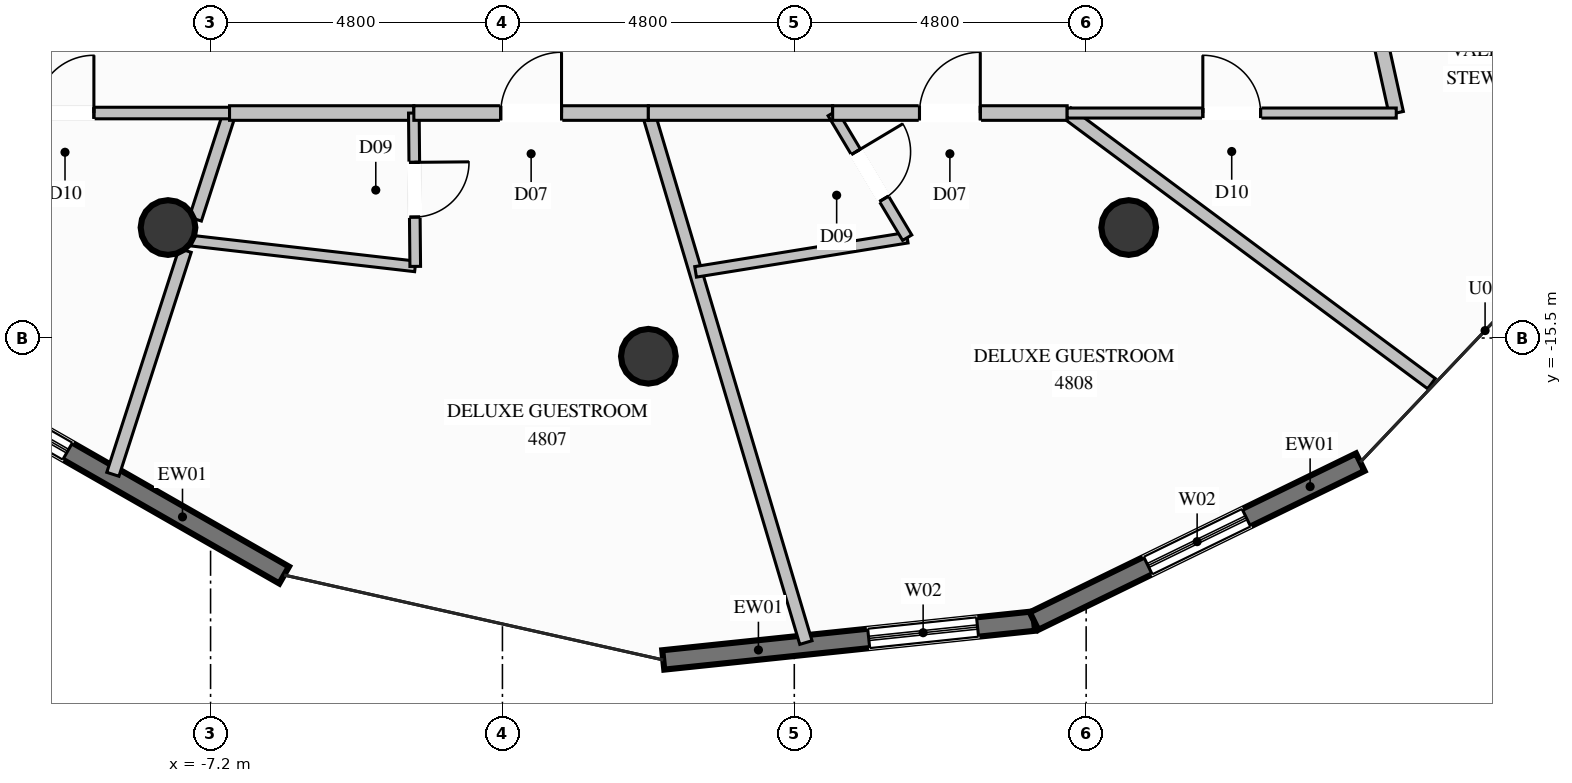
"""IFC4 building model, lengths in metres.
Left out: names, types, materials, properties, quantities, classifications, styles, units other than length and angle.
Written with IfcOpenShell. Run it as: python <this file> out.ifc"""

import sys

from ifc_helpers import new_model, si_unit, direction, frame, frame_2d, origin, origin_2d, place, context, subcontext, project, spatial, rectangle, circle, extrude, element, fill, save


model = new_model("IFC4")
c1 = context("Model", 3, precision=1e-05, world=origin(), true_north=direction((0.0, 1.0)))
c2 = subcontext(c1, "Body", "Model", "MODEL_VIEW")
j1 = project(units=[si_unit("LENGTHUNIT", "METRE"), si_unit("PLANEANGLEUNIT", "RADIAN")], contexts=[c1])
p1 = place(None, origin())
s1 = spatial("IfcSite", under=j1, at=p1, CompositionType="ELEMENT")
p2 = place(p1, origin())
s2 = spatial("IfcBuilding", under=s1, at=p2, CompositionType="ELEMENT")
p3 = place(p2, frame((0.0, 0.0, 180.4)))
s3 = spatial("IfcBuildingStorey", under=s2, at=p3, CompositionType="ELEMENT", Elevation=180.4)
for number, where, z_axis, x_axis in (
    (1, (-7.9, -13.683, 0.0), (0.0, 0.0, 1.0), (1.0, 0.0, 0.0)),
    (2, (0.0, -15.8, 0.0), (0.0, 0.0, 1.0), (1.0, 0.0, 0.0)),
    (3, (7.9, -13.683, 0.0), (0.0, 0.0, 1.0), (1.0, 0.0, 0.0)),
):
    element("IfcColumn", number, at=place(p3, frame(where, z_axis=z_axis, x_axis=x_axis)), inside=s3, PredefinedType="COLUMN", context=c2, shape_type="SweptSolid", body=[
        extrude(circle(Radius=0.45, at=origin_2d()), origin(), (0.0, 0.0, 1.0), 3.6),
    ])
p4 = place(p3, frame((-5.99, -19.398, 0.0), z_axis=(0.0, 0.0, 1.0), x_axis=(-0.868052920032, 0.496471678974, 0.0)))
e4 = element("IfcWall", 4, at=p4, inside=s3, PredefinedType="SOLIDWALL", context=c2, shape_type="SweptSolid", body=[
    extrude(rectangle(XDim=6.637, YDim=0.32, at=frame_2d((3.318, 0.0))), origin(), (0.0, 0.0, 1.0), 3.36),
])
p5 = place(p4, frame((4.102, 0.0, 0.35)))
e5 = element("IfcOpeningElement", 5, at=p5, cuts=e4, PredefinedType="OPENING", context=c2, shape_type="SweptSolid", body=[
    extrude(rectangle(XDim=1.8, YDim=2.6, at=frame_2d((0.9, 1.3))), frame((0.0, 0.17, 0.0), z_axis=(0.0, -1.0, 0.0), x_axis=(1.0, 0.0, 0.0)), (0.0, 0.0, 1.0), 0.34),
])
p6 = place(p3, frame((6.343, -20.155, 0.0), z_axis=(0.0, 0.0, 1.0), x_axis=(-0.994555738522, -0.104205964195, 0.0)))
e6 = element("IfcWall", 6, at=p6, inside=s3, PredefinedType="SOLIDWALL", context=c2, shape_type="SweptSolid", body=[
    extrude(rectangle(XDim=6.131, YDim=0.32, at=frame_2d((3.066, 0.0))), origin(), (0.0, 0.0, 1.0), 3.36),
])
p7 = place(p6, frame((0.934, 0.0, 0.35)))
e7 = element("IfcOpeningElement", 7, at=p7, cuts=e6, PredefinedType="OPENING", context=c2, shape_type="SweptSolid", body=[
    extrude(rectangle(XDim=1.8, YDim=2.6, at=frame_2d((0.9, 1.3))), frame((0.0, 0.17, 0.0), z_axis=(0.0, -1.0, 0.0), x_axis=(1.0, 0.0, 0.0)), (0.0, 0.0, 1.0), 0.34),
])
p8 = place(p3, frame((11.708, -17.542, 0.0), z_axis=(0.0, 0.0, 1.0), x_axis=(-0.899034471399, -0.437877858811, 0.0)))
e8 = element("IfcWall", 8, at=p8, inside=s3, PredefinedType="SOLIDWALL", context=c2, shape_type="SweptSolid", body=[
    extrude(rectangle(XDim=5.968, YDim=0.32, at=frame_2d((2.984, 0.0))), origin(), (0.0, 0.0, 1.0), 3.36),
])
p9 = place(p8, frame((2.084, 0.0, 0.35)))
e9 = element("IfcOpeningElement", 9, at=p9, cuts=e8, PredefinedType="OPENING", context=c2, shape_type="SweptSolid", body=[
    extrude(rectangle(XDim=1.8, YDim=2.6, at=frame_2d((0.9, 1.3))), frame((0.0, 0.17, 0.0), z_axis=(0.0, -1.0, 0.0), x_axis=(1.0, 0.0, 0.0)), (0.0, 0.0, 1.0), 0.34),
])
p10 = place(p3, frame((-6.888, -11.8, 0.0), z_axis=(0.0, 0.0, 1.0), x_axis=(-0.307220756357, -0.95163827522, 0.0)))
e10 = element("IfcWall", 10, at=p10, inside=s3, PredefinedType="PARTITIONING", context=c2, shape_type="SweptSolid", body=[
    extrude(rectangle(XDim=1.833, YDim=0.21, at=frame_2d((0.916, 0.0))), origin(), (0.0, 0.0, 1.0), 2.801),
])
p11 = place(p3, frame((-7.618, -14.059, 0.0), z_axis=(0.0, 0.0, 1.0), x_axis=(-0.307297747986, -0.9516134163, 0.0)))
e11 = element("IfcWall", 11, at=p11, inside=s3, PredefinedType="PARTITIONING", context=c2, shape_type="SweptSolid", body=[
    extrude(rectangle(XDim=3.869, YDim=0.21, at=frame_2d((1.935, 0.0))), origin(), (0.0, 0.0, 1.0), 3.36),
])
p12 = place(p3, frame((-12.3, -11.8, 0.0), z_axis=(0.0, 0.0, 1.0), x_axis=(1.0, 0.0, 0.0)))
e12 = element("IfcWall", 12, at=p12, inside=s3, PredefinedType="PARTITIONING", context=c2, shape_type="SweptSolid", body=[
    extrude(rectangle(XDim=5.412, YDim=0.19, at=frame_2d((2.706, 0.0))), origin(), (0.0, 0.0, 1.0), 3.36),
])
p13 = place(p12, frame((2.231, 0.0, 0.0)))
e13 = element("IfcOpeningElement", 13, at=p13, cuts=e12, PredefinedType="OPENING", context=c2, shape_type="SweptSolid", body=[
    extrude(rectangle(XDim=0.95, YDim=2.1, at=frame_2d((0.475, 1.05))), frame((0.0, 0.105, 0.0), z_axis=(0.0, -1.0, 0.0), x_axis=(1.0, 0.0, 0.0)), (0.0, 0.0, 1.0), 0.21),
])
p14 = place(p3, frame((-6.888, -11.8, 0.0), z_axis=(0.0, 0.0, 1.0), x_axis=(1.0, 0.0, 0.0)))
e14 = element("IfcWall", 14, at=p14, inside=s3, PredefinedType="PARTITIONING", context=c2, shape_type="SweptSolid", body=[
    extrude(rectangle(XDim=3.031, YDim=0.24, at=frame_2d((1.516, 0.0))), origin(), (0.0, 0.0, 1.0), 3.36),
])
p15 = place(p3, frame((-7.564, -13.893, 0.0), z_axis=(0.0, 0.0, 1.0), x_axis=(0.993452151759, -0.114248948203, 0.0)))
e15 = element("IfcWall", 15, at=p15, inside=s3, PredefinedType="PLUMBINGWALL", context=c2, shape_type="SweptSolid", body=[
    extrude(rectangle(XDim=3.755, YDim=0.175, at=frame_2d((1.877, 0.0))), origin(), (0.0, 0.0, 1.0), 2.929),
])
p16 = place(p3, frame((-3.857, -11.8, 0.0), z_axis=(0.0, 0.0, 1.0), x_axis=(0.009099332858, -0.999958600214, 0.0)))
e16 = element("IfcWall", 16, at=p16, inside=s3, PredefinedType="PLUMBINGWALL", context=c2, shape_type="SweptSolid", body=[
    extrude(rectangle(XDim=2.522, YDim=0.175, at=frame_2d((1.261, 0.0))), origin(), (0.0, 0.0, 1.0), 3.36),
])
p17 = place(p16, frame((0.811, 0.0, 0.0)))
e17 = element("IfcOpeningElement", 17, at=p17, cuts=e16, PredefinedType="OPENING", context=c2, shape_type="SweptSolid", body=[
    extrude(rectangle(XDim=0.9, YDim=2.1, at=frame_2d((0.45, 1.05))), frame((0.0, 0.098, 0.0), z_axis=(0.0, -1.0, 0.0), x_axis=(1.0, 0.0, 0.0)), (0.0, 0.0, 1.0), 0.195),
])
p18 = place(p3, frame((0.0, -11.8, 0.0), z_axis=(0.0, 0.0, 1.0), x_axis=(0.285192468368, -0.958470268702, 0.0)))
e18 = element("IfcWall", 18, at=p18, inside=s3, PredefinedType="PARTITIONING", context=c2, shape_type="SweptSolid", body=[
    extrude(rectangle(XDim=9.085, YDim=0.21, at=frame_2d((4.542, 0.0))), origin(), (0.0, 0.0, 1.0), 3.36),
])
p19 = place(p3, frame((-3.857, -11.8, 0.0), z_axis=(0.0, 0.0, 1.0), x_axis=(1.0, 0.0, 0.0)))
e19 = element("IfcWall", 19, at=p19, inside=s3, PredefinedType="PARTITIONING", context=c2, shape_type="SweptSolid", body=[
    extrude(rectangle(XDim=3.857, YDim=0.24, at=frame_2d((1.928, 0.0))), origin(), (0.0, 0.0, 1.0), 3.36),
])
p20 = place(p19, frame((1.429, 0.0, 0.0)))
e20 = element("IfcOpeningElement", 20, at=p20, cuts=e19, PredefinedType="OPENING", context=c2, shape_type="SweptSolid", body=[
    extrude(rectangle(XDim=1.0, YDim=2.2, at=frame_2d((0.5, 1.1))), frame((0.0, 0.13, 0.0), z_axis=(0.0, -1.0, 0.0), x_axis=(1.0, 0.0, 0.0)), (0.0, 0.0, 1.0), 0.26),
])
p21 = place(p3, frame((0.0, -11.8, 0.0), z_axis=(0.0, 0.0, 1.0), x_axis=(1.0, 0.0, 0.0)))
e21 = element("IfcWall", 21, at=p21, inside=s3, PredefinedType="PARTITIONING", context=c2, shape_type="SweptSolid", body=[
    extrude(rectangle(XDim=3.031, YDim=0.24, at=frame_2d((1.516, 0.0))), origin(), (0.0, 0.0, 1.0), 3.36),
])
p22 = place(p3, frame((0.777, -14.412, 0.0), z_axis=(0.0, 0.0, 1.0), x_axis=(0.987208789181, 0.159432765027, 0.0)))
e22 = element("IfcWall", 22, at=p22, inside=s3, PredefinedType="PLUMBINGWALL", context=c2, shape_type="SweptSolid", body=[
    extrude(rectangle(XDim=3.525, YDim=0.175, at=frame_2d((1.763, 0.0))), origin(), (0.0, 0.0, 1.0), 3.36),
])
p23 = place(p3, frame((3.031, -11.8, 0.0), z_axis=(0.0, 0.0, 1.0), x_axis=(0.513277784821, -0.858222532685, 0.0)))
e23 = element("IfcWall", 23, at=p23, inside=s3, PredefinedType="PLUMBINGWALL", context=c2, shape_type="SweptSolid", body=[
    extrude(rectangle(XDim=2.389, YDim=0.175, at=frame_2d((1.194, 0.0))), origin(), (0.0, 0.0, 1.0), 3.36),
])
p24 = place(p23, frame((0.744, 0.0, 0.0)))
e24 = element("IfcOpeningElement", 24, at=p24, cuts=e23, PredefinedType="OPENING", context=c2, shape_type="SweptSolid", body=[
    extrude(rectangle(XDim=0.9, YDim=2.1, at=frame_2d((0.45, 1.05))), frame((0.0, 0.098, 0.0), z_axis=(0.0, -1.0, 0.0), x_axis=(1.0, 0.0, 0.0)), (0.0, 0.0, 1.0), 0.195),
])
p25 = place(p3, frame((6.888, -11.8, 0.0), z_axis=(0.0, 0.0, 1.0), x_axis=(0.802774719759, -0.596282440892, 0.0)))
e25 = element("IfcWall", 25, at=p25, inside=s3, PredefinedType="PARTITIONING", context=c2, shape_type="SweptSolid", body=[
    extrude(rectangle(XDim=7.463, YDim=0.21, at=frame_2d((3.731, 0.0))), origin(), (0.0, 0.0, 1.0), 3.36),
])
p26 = place(p3, frame((3.031, -11.8, 0.0), z_axis=(0.0, 0.0, 1.0), x_axis=(1.0, 0.0, 0.0)))
e26 = element("IfcWall", 26, at=p26, inside=s3, PredefinedType="PARTITIONING", context=c2, shape_type="SweptSolid", body=[
    extrude(rectangle(XDim=3.857, YDim=0.24, at=frame_2d((1.928, 0.0))), origin(), (0.0, 0.0, 1.0), 3.36),
])
p27 = place(p26, frame((1.428, 0.0, 0.0)))
e27 = element("IfcOpeningElement", 27, at=p27, cuts=e26, PredefinedType="OPENING", context=c2, shape_type="SweptSolid", body=[
    extrude(rectangle(XDim=1.0, YDim=2.2, at=frame_2d((0.5, 1.1))), frame((0.0, 0.13, 0.0), z_axis=(0.0, -1.0, 0.0), x_axis=(1.0, 0.0, 0.0)), (0.0, 0.0, 1.0), 0.26),
])
p28 = place(p3, frame((12.3, -11.8, 0.0), z_axis=(0.0, 0.0, 1.0), x_axis=(-0.21572328796, 0.976454537104, 0.0)))
e28 = element("IfcWall", 28, at=p28, inside=s3, PredefinedType="PARTITIONING", context=c2, shape_type="SweptSolid", body=[
    extrude(rectangle(XDim=5.633, YDim=0.24, at=frame_2d((2.816, 0.0))), origin(), (0.0, 0.0, 1.0), 3.36),
])
p29 = place(p3, frame((6.888, -11.8, 0.0), z_axis=(0.0, 0.0, 1.0), x_axis=(1.0, 0.0, 0.0)))
e29 = element("IfcWall", 29, at=p29, inside=s3, PredefinedType="PARTITIONING", context=c2, shape_type="SweptSolid", body=[
    extrude(rectangle(XDim=5.412, YDim=0.165, at=frame_2d((2.706, 0.0))), origin(), (0.0, 0.0, 1.0), 3.36),
])
p30 = place(p29, frame((2.231, 0.0, 0.0)))
e30 = element("IfcOpeningElement", 30, at=p30, cuts=e29, PredefinedType="OPENING", context=c2, shape_type="SweptSolid", body=[
    extrude(rectangle(XDim=0.95, YDim=2.1, at=frame_2d((0.475, 1.05))), frame((0.0, 0.093, 0.0), z_axis=(0.0, -1.0, 0.0), x_axis=(1.0, 0.0, 0.0)), (0.0, 0.0, 1.0), 0.185),
])
p31 = place(p5, origin())
e31 = element("IfcWindow", 31, at=p31, inside=s3, PartitioningType="SINGLE_PANEL", PredefinedType="WINDOW", context=c2, shape_type="SweptSolid", body=[
    extrude(rectangle(XDim=1.8, YDim=2.6, at=frame_2d((0.9, 1.3))), frame((0.0, 0.03, 0.0), z_axis=(0.0, -1.0, 0.0), x_axis=(1.0, 0.0, 0.0)), (0.0, 0.0, 1.0), 0.06),
])
fill(e5, e31)
p32 = place(p7, origin())
e32 = element("IfcWindow", 32, at=p32, inside=s3, PartitioningType="SINGLE_PANEL", PredefinedType="WINDOW", context=c2, shape_type="SweptSolid", body=[
    extrude(rectangle(XDim=1.8, YDim=2.6, at=frame_2d((0.9, 1.3))), frame((0.0, 0.03, 0.0), z_axis=(0.0, -1.0, 0.0), x_axis=(1.0, 0.0, 0.0)), (0.0, 0.0, 1.0), 0.06),
])
fill(e7, e32)
p33 = place(p9, origin())
e33 = element("IfcWindow", 33, at=p33, inside=s3, PartitioningType="SINGLE_PANEL", PredefinedType="WINDOW", context=c2, shape_type="SweptSolid", body=[
    extrude(rectangle(XDim=1.8, YDim=2.6, at=frame_2d((0.9, 1.3))), frame((0.0, 0.03, 0.0), z_axis=(0.0, -1.0, 0.0), x_axis=(1.0, 0.0, 0.0)), (0.0, 0.0, 1.0), 0.06),
])
fill(e9, e33)
p34 = place(p13, origin())
e34 = element("IfcDoor", 34, at=p34, inside=s3, OperationType="SINGLE_SWING_RIGHT", PredefinedType="DOOR", context=c2, shape_type="SweptSolid", body=[
    extrude(rectangle(XDim=0.95, YDim=2.1, at=frame_2d((0.475, 1.05))), frame((0.0, 0.025, 0.0), z_axis=(0.0, -1.0, 0.0), x_axis=(1.0, 0.0, 0.0)), (0.0, 0.0, 1.0), 0.05),
])
fill(e13, e34)
p35 = place(p17, origin())
e35 = element("IfcDoor", 35, at=p35, inside=s3, OperationType="SINGLE_SWING_LEFT", PredefinedType="DOOR", context=c2, shape_type="SweptSolid", body=[
    extrude(rectangle(XDim=0.9, YDim=2.1, at=frame_2d((0.45, 1.05))), frame((0.0, 0.025, 0.0), z_axis=(0.0, -1.0, 0.0), x_axis=(1.0, 0.0, 0.0)), (0.0, 0.0, 1.0), 0.05),
])
fill(e17, e35)
p36 = place(p20, origin())
e36 = element("IfcDoor", 36, at=p36, inside=s3, OperationType="SINGLE_SWING_RIGHT", PredefinedType="DOOR", context=c2, shape_type="SweptSolid", body=[
    extrude(rectangle(XDim=1.0, YDim=2.2, at=frame_2d((0.5, 1.1))), frame((0.0, 0.025, 0.0), z_axis=(0.0, -1.0, 0.0), x_axis=(1.0, 0.0, 0.0)), (0.0, 0.0, 1.0), 0.05),
])
fill(e20, e36)
p37 = place(p24, origin())
e37 = element("IfcDoor", 37, at=p37, inside=s3, OperationType="SINGLE_SWING_LEFT", PredefinedType="DOOR", context=c2, shape_type="SweptSolid", body=[
    extrude(rectangle(XDim=0.9, YDim=2.1, at=frame_2d((0.45, 1.05))), frame((0.0, 0.025, 0.0), z_axis=(0.0, -1.0, 0.0), x_axis=(1.0, 0.0, 0.0)), (0.0, 0.0, 1.0), 0.05),
])
fill(e24, e37)
p38 = place(p27, origin())
e38 = element("IfcDoor", 38, at=p38, inside=s3, OperationType="SINGLE_SWING_RIGHT", PredefinedType="DOOR", context=c2, shape_type="SweptSolid", body=[
    extrude(rectangle(XDim=1.0, YDim=2.2, at=frame_2d((0.5, 1.1))), frame((0.0, 0.025, 0.0), z_axis=(0.0, -1.0, 0.0), x_axis=(1.0, 0.0, 0.0)), (0.0, 0.0, 1.0), 0.05),
])
fill(e27, e38)
p39 = place(p30, origin())
e39 = element("IfcDoor", 39, at=p39, inside=s3, OperationType="SINGLE_SWING_LEFT", PredefinedType="DOOR", context=c2, shape_type="SweptSolid", body=[
    extrude(rectangle(XDim=0.95, YDim=2.1, at=frame_2d((0.475, 1.05))), frame((0.0, 0.025, 0.0), z_axis=(0.0, -1.0, 0.0), x_axis=(1.0, 0.0, 0.0)), (0.0, 0.0, 1.0), 0.05),
])
fill(e30, e39)
save(model, sys.argv[1])
